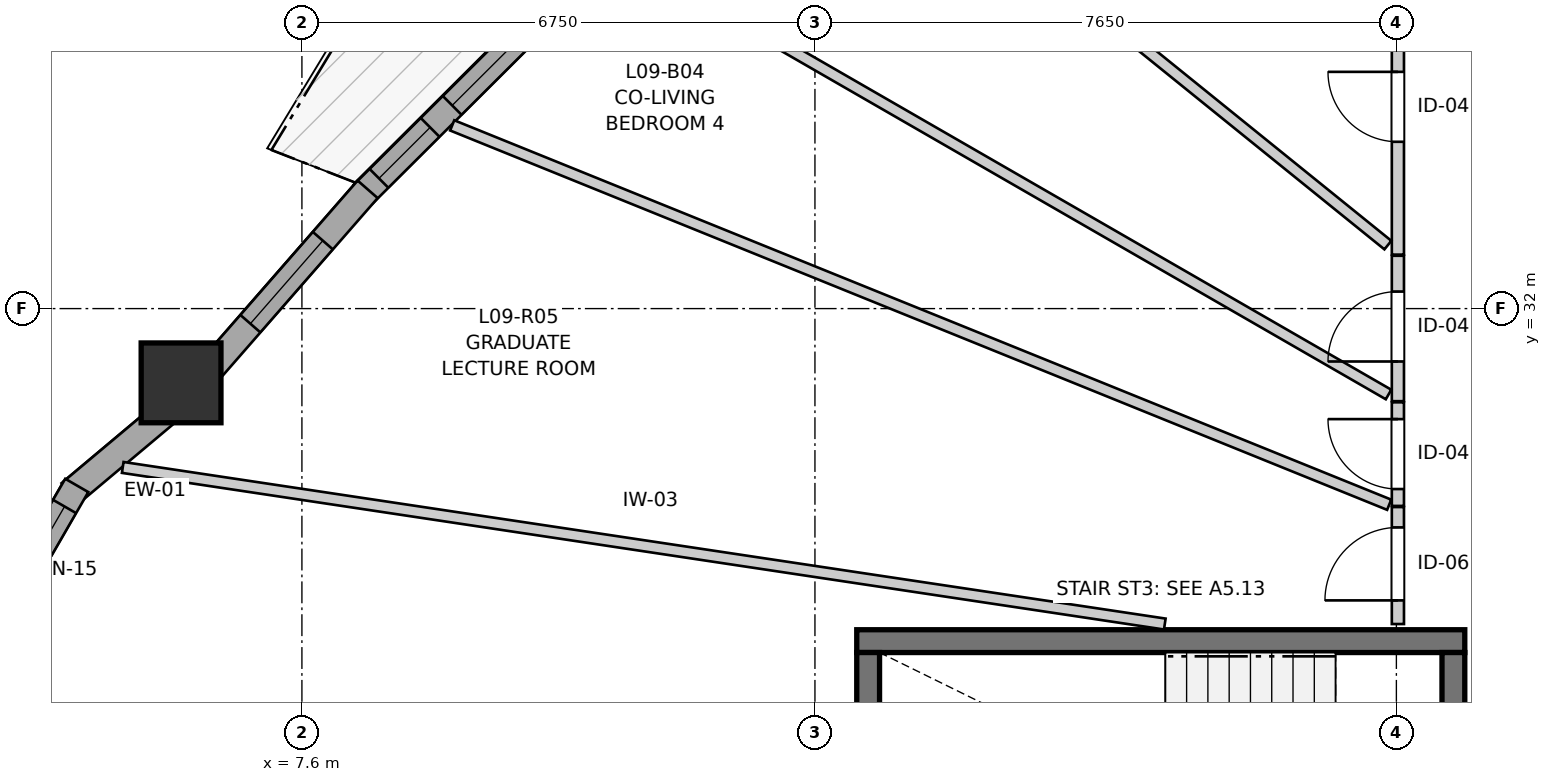
"""IFC4 building model, lengths in metres.
Left out: names, types, materials, properties, quantities, classifications, styles, units other than length and angle.
Written with IfcOpenShell. Run it as: python <this file> out.ifc"""

import sys

from ifc_helpers import new_model, si_unit, direction, frame, frame_2d, origin, origin_2d, place, context, subcontext, project, spatial, rectangle, extrude, source, transform, mapped, element, fill, save


model = new_model("IFC4")
c1 = context("Model", 3, precision=1e-05, world=origin(), true_north=direction((0.0, 1.0)))
c2 = subcontext(c1, "Body", "Model", "MODEL_VIEW")
j1 = project(units=[si_unit("LENGTHUNIT", "METRE"), si_unit("PLANEANGLEUNIT", "RADIAN")], contexts=[c1])
p1 = place(None, origin())
s1 = spatial("IfcSite", under=j1, at=p1, CompositionType="ELEMENT")
p2 = place(p1, origin())
s2 = spatial("IfcBuilding", under=s1, at=p2, CompositionType="ELEMENT")
p3 = place(p2, frame((0.0, 0.0, 33.4)))
s3 = spatial("IfcBuildingStorey", under=s2, at=p3, CompositionType="ELEMENT", Elevation=33.4)
p4 = place(p3, frame((22.9, 27.625, 0.0), z_axis=(0.0, 0.0, 1.0), x_axis=(-1.0, 0.0, 0.0)))
e1 = element("IfcWall", 1, at=p4, inside=s3, PredefinedType="SHEAR", context=c2, shape_type="SweptSolid", body=[
    extrude(rectangle(XDim=8.0, YDim=0.3, at=frame_2d((4.0, 0.0))), origin(), (0.0, 0.0, 1.0), 2.94),
])
p5 = place(p3, frame((15.05, 27.475, 0.0), z_axis=(0.0, 0.0, 1.0), x_axis=(0.0, -1.0, 0.0)))
e2 = element("IfcWall", 2, at=p5, inside=s3, PredefinedType="SHEAR", context=c2, shape_type="SweptSolid", body=[
    extrude(rectangle(XDim=2.95, YDim=0.3, at=frame_2d((1.475, 0.0))), origin(), (0.0, 0.0, 1.0), 2.94),
])
p6 = place(p3, frame((22.75, 24.525, 0.0), z_axis=(0.0, 0.0, 1.0), x_axis=(0.0, 1.0, 0.0)))
e3 = element("IfcWall", 3, at=p6, inside=s3, PredefinedType="SHEAR", context=c2, shape_type="SweptSolid", body=[
    extrude(rectangle(XDim=2.95, YDim=0.3, at=frame_2d((1.475, 0.0))), origin(), (0.0, 0.0, 1.0), 2.94),
])
p7 = place(p6, frame((0.985, 0.0, 0.0)))
e4 = element("IfcOpeningElement", 4, at=p7, cuts=e3, PredefinedType="OPENING", context=c2, shape_type="SweptSolid", body=[
    extrude(rectangle(XDim=0.98, YDim=2.15, at=frame_2d((0.49, 1.075))), frame((0.0, 0.16, 0.0), z_axis=(0.0, -1.0, 0.0), x_axis=(1.0, 0.0, 0.0)), (0.0, 0.0, 1.0), 0.32),
])
m1 = source(origin(), c2, "Body", "SweptSolid", [
    extrude(rectangle(XDim=1.05, YDim=1.05, at=origin_2d()), origin(), (0.0, 0.0, 1.0), 2.94),
])
p8 = place(p3, frame((6.01, 31.023, 0.0), z_axis=(0.0, 0.0, 1.0), x_axis=(1.0, 0.0, 0.0)))
e5 = element("IfcColumn", 5, at=p8, inside=s3, PredefinedType="COLUMN", context=c2, shape_type="MappedRepresentation", body=[
    mapped(m1, transform((0.0, 0.0, 0.0), x_axis=(1.0, 0.0, 0.0), y_axis=(0.0, 1.0, 0.0), z_axis=(0.0, 0.0, 1.0), scale=1.0)),
])
p9 = place(p3, frame((5.893, 30.696, 0.0), z_axis=(0.0, 0.0, 1.0), x_axis=(-0.766001205563, -0.64283913468, 0.0)))
e6 = element("IfcWall", 6, at=p9, inside=s3, PredefinedType="SOLIDWALL", context=c2, shape_type="SweptSolid", body=[
    extrude(rectangle(XDim=1.752, YDim=0.35, at=frame_2d((0.876, 0.0))), origin(), (0.0, 0.0, 1.0), 2.42),
])
p10 = place(p3, frame((4.637, 29.674, 0.0), z_axis=(0.0, 0.0, 1.0), x_axis=(-0.499995423472, -0.866028046028, 0.0)))
e7 = element("IfcWall", 7, at=p10, inside=s3, PredefinedType="SOLIDWALL", context=c2, shape_type="SweptSolid", body=[
    extrude(rectangle(XDim=2.09, YDim=0.35, at=frame_2d((1.045, 0.0))), origin(), (0.0, 0.0, 1.0), 2.42),
])
p11 = place(p10, frame((0.32, 0.0, 0.82)))
e8 = element("IfcOpeningElement", 8, at=p11, cuts=e7, PredefinedType="OPENING", context=c2, shape_type="SweptSolid", body=[
    extrude(rectangle(XDim=1.45, YDim=1.25, at=frame_2d((0.725, 0.625))), frame((0.0, 0.185, 0.0), z_axis=(0.0, -1.0, 0.0), x_axis=(1.0, 0.0, 0.0)), (0.0, 0.0, 1.0), 0.37),
])
p12 = place(p3, frame((10.841, 35.932, 0.0), z_axis=(0.0, 0.0, 1.0), x_axis=(-0.708383272101, -0.70582798174, 0.0)))
e9 = element("IfcWall", 9, at=p12, inside=s3, PredefinedType="SOLIDWALL", context=c2, shape_type="SweptSolid", body=[
    extrude(rectangle(XDim=3.439, YDim=0.35, at=frame_2d((1.72, 0.0))), origin(), (0.0, 0.0, 1.0), 2.42),
])
p13 = place(p12, frame((0.334, 0.0, 0.82)))
e10 = element("IfcOpeningElement", 10, at=p13, cuts=e9, PredefinedType="OPENING", context=c2, shape_type="SweptSolid", body=[
    extrude(rectangle(XDim=1.45, YDim=1.25, at=frame_2d((0.725, 0.625))), frame((0.0, 0.185, 0.0), z_axis=(0.0, -1.0, 0.0), x_axis=(1.0, 0.0, 0.0)), (0.0, 0.0, 1.0), 0.37),
])
p14 = place(p12, frame((2.194, 0.0, 0.82)))
e11 = element("IfcOpeningElement", 11, at=p14, cuts=e9, PredefinedType="OPENING", context=c2, shape_type="SweptSolid", body=[
    extrude(rectangle(XDim=0.95, YDim=1.35, at=frame_2d((0.475, 0.675))), frame((0.0, 0.185, 0.0), z_axis=(0.0, -1.0, 0.0), x_axis=(1.0, 0.0, 0.0)), (0.0, 0.0, 1.0), 0.37),
])
p15 = place(p3, frame((8.465, 33.569, 0.0), z_axis=(0.0, 0.0, 1.0), x_axis=(-0.657600500685, -0.753366830634, 0.0)))
e12 = element("IfcWall", 12, at=p15, inside=s3, PredefinedType="SOLIDWALL", context=c2, shape_type="SweptSolid", body=[
    extrude(rectangle(XDim=3.233, YDim=0.35, at=frame_2d((1.616, 0.0))), origin(), (0.0, 0.0, 1.0), 2.42),
])
p16 = place(p15, frame((0.896, 0.0, 0.82)))
e13 = element("IfcOpeningElement", 13, at=p16, cuts=e12, PredefinedType="OPENING", context=c2, shape_type="SweptSolid", body=[
    extrude(rectangle(XDim=1.45, YDim=1.25, at=frame_2d((0.725, 0.625))), frame((0.0, 0.185, 0.0), z_axis=(0.0, -1.0, 0.0), x_axis=(1.0, 0.0, 0.0)), (0.0, 0.0, 1.0), 0.37),
])
p17 = place(p3, frame((22.02, 32.71, 0.0), z_axis=(0.0, 0.0, 1.0), x_axis=(0.0, 1.0, 0.0)))
e14 = element("IfcWall", 14, at=p17, inside=s3, PredefinedType="PARTITIONING", context=c2, shape_type="SweptSolid", body=[
    extrude(rectangle(XDim=3.87, YDim=0.16, at=frame_2d((1.935, 0.0))), origin(), (0.0, 0.0, 1.0), 2.94),
])
p18 = place(p17, frame((1.485, 0.0, 0.0)))
e15 = element("IfcOpeningElement", 15, at=p18, cuts=e14, PredefinedType="OPENING", context=c2, shape_type="SweptSolid", body=[
    extrude(rectangle(XDim=0.92, YDim=2.1, at=frame_2d((0.46, 1.05))), frame((0.0, 0.09, 0.0), z_axis=(0.0, -1.0, 0.0), x_axis=(1.0, 0.0, 0.0)), (0.0, 0.0, 1.0), 0.18),
])
p19 = place(p3, frame((22.02, 30.782, 0.0), z_axis=(0.0, 0.0, 1.0), x_axis=(0.0, 1.0, 0.0)))
e16 = element("IfcWall", 16, at=p19, inside=s3, PredefinedType="PARTITIONING", context=c2, shape_type="SweptSolid", body=[
    extrude(rectangle(XDim=1.913, YDim=0.16, at=frame_2d((0.957, 0.0))), origin(), (0.0, 0.0, 1.0), 2.94),
])
p20 = place(p19, frame((0.522, 0.0, 0.0)))
e17 = element("IfcOpeningElement", 17, at=p20, cuts=e16, PredefinedType="OPENING", context=c2, shape_type="SweptSolid", body=[
    extrude(rectangle(XDim=0.92, YDim=2.1, at=frame_2d((0.46, 1.05))), frame((0.0, 0.09, 0.0), z_axis=(0.0, -1.0, 0.0), x_axis=(1.0, 0.0, 0.0)), (0.0, 0.0, 1.0), 0.18),
])
p21 = place(p3, frame((22.02, 27.85, 0.0), z_axis=(0.0, 0.0, 1.0), x_axis=(0.0, 1.0, 0.0)))
e18 = element("IfcWall", 18, at=p21, inside=s3, PredefinedType="PARTITIONING", context=c2, shape_type="SweptSolid", body=[
    extrude(rectangle(XDim=1.539, YDim=0.16, at=frame_2d((0.77, 0.0))), origin(), (0.0, 0.0, 1.0), 2.94),
])
p22 = place(p21, frame((0.311, 0.0, 0.0)))
e19 = element("IfcOpeningElement", 19, at=p22, cuts=e18, PredefinedType="OPENING", context=c2, shape_type="SweptSolid", body=[
    extrude(rectangle(XDim=0.96, YDim=2.1, at=frame_2d((0.48, 1.05))), frame((0.0, 0.09, 0.0), z_axis=(0.0, -1.0, 0.0), x_axis=(1.0, 0.0, 0.0)), (0.0, 0.0, 1.0), 0.18),
])
p23 = place(p3, frame((22.02, 29.404, 0.0), z_axis=(0.0, 0.0, 1.0), x_axis=(0.0, 1.0, 0.0)))
e20 = element("IfcWall", 20, at=p23, inside=s3, PredefinedType="PARTITIONING", context=c2, shape_type="SweptSolid", body=[
    extrude(rectangle(XDim=1.363, YDim=0.16, at=frame_2d((0.682, 0.0))), origin(), (0.0, 0.0, 1.0), 2.94),
])
p24 = place(p23, frame((0.222, 0.0, 0.0)))
e21 = element("IfcOpeningElement", 21, at=p24, cuts=e20, PredefinedType="OPENING", context=c2, shape_type="SweptSolid", body=[
    extrude(rectangle(XDim=0.92, YDim=2.1, at=frame_2d((0.46, 1.05))), frame((0.0, 0.09, 0.0), z_axis=(0.0, -1.0, 0.0), x_axis=(1.0, 0.0, 0.0)), (0.0, 0.0, 1.0), 0.18),
])
p25 = place(p3, frame((5.242, 29.91, 0.0), z_axis=(0.0, 0.0, 1.0), x_axis=(0.988899381561, -0.148586719285, 0.0)))
e22 = element("IfcWall", 22, at=p25, inside=s3, PredefinedType="PARTITIONING", context=c2, shape_type="SweptSolid", body=[
    extrude(rectangle(XDim=13.864, YDim=0.145, at=frame_2d((6.932, 0.0))), origin(), (0.0, 0.0, 1.0), 2.94),
])
p26 = place(p3, frame((9.577, 34.41, 0.0), z_axis=(0.0, 0.0, 1.0), x_axis=(0.926920362809, -0.375258099194, 0.0)))
e23 = element("IfcWall", 23, at=p26, inside=s3, PredefinedType="PARTITIONING", context=c2, shape_type="SweptSolid", body=[
    extrude(rectangle(XDim=13.3, YDim=0.145, at=frame_2d((6.65, 0.0))), origin(), (0.0, 0.0, 1.0), 2.94),
])
p27 = place(p3, frame((11.92, 36.618, 0.0), z_axis=(0.0, 0.0, 1.0), x_axis=(0.866473494239, -0.499223080177, 0.0)))
e24 = element("IfcWall", 24, at=p27, inside=s3, PredefinedType="PARTITIONING", context=c2, shape_type="SweptSolid", body=[
    extrude(rectangle(XDim=11.514, YDim=0.145, at=frame_2d((5.757, 0.0))), origin(), (0.0, 0.0, 1.0), 2.94),
])
p28 = place(p3, frame((14.566, 38.751, 0.0), z_axis=(0.0, 0.0, 1.0), x_axis=(0.777881688073, -0.628410756879, 0.0)))
e25 = element("IfcWall", 25, at=p28, inside=s3, PredefinedType="PARTITIONING", context=c2, shape_type="SweptSolid", body=[
    extrude(rectangle(XDim=9.413, YDim=0.145, at=frame_2d((4.707, 0.0))), origin(), (0.0, 0.0, 1.0), 2.94),
])
m2 = source(origin(), c2, "Body", "SweptSolid", [
    extrude(rectangle(XDim=1.45, YDim=1.25, at=frame_2d((0.725, 0.625))), frame((0.0, 0.03, 0.0), z_axis=(0.0, -1.0, 0.0), x_axis=(1.0, 0.0, 0.0)), (0.0, 0.0, 1.0), 0.06),
])
p29 = place(p11, origin())
e26 = element("IfcWindow", 26, at=p29, inside=s3, PartitioningType="SINGLE_PANEL", PredefinedType="WINDOW", context=c2, shape_type="MappedRepresentation", body=[
    mapped(m2, transform((0.0, 0.0, 0.0), x_axis=(1.0, 0.0, 0.0), y_axis=(0.0, 1.0, 0.0), z_axis=(0.0, 0.0, 1.0), scale=1.0)),
])
fill(e8, e26)
p30 = place(p13, origin())
e27 = element("IfcWindow", 27, at=p30, inside=s3, PartitioningType="SINGLE_PANEL", PredefinedType="WINDOW", context=c2, shape_type="MappedRepresentation", body=[
    mapped(m2, transform((0.0, 0.0, 0.0), x_axis=(1.0, 0.0, 0.0), y_axis=(0.0, 1.0, 0.0), z_axis=(0.0, 0.0, 1.0), scale=1.0)),
])
fill(e10, e27)
m3 = source(origin(), c2, "Body", "SweptSolid", [
    extrude(rectangle(XDim=0.95, YDim=1.35, at=frame_2d((0.475, 0.675))), frame((0.0, 0.03, 0.0), z_axis=(0.0, -1.0, 0.0), x_axis=(1.0, 0.0, 0.0)), (0.0, 0.0, 1.0), 0.06),
])
p31 = place(p14, origin())
e28 = element("IfcWindow", 28, at=p31, inside=s3, PartitioningType="SINGLE_PANEL", PredefinedType="WINDOW", context=c2, shape_type="MappedRepresentation", body=[
    mapped(m3, transform((0.0, 0.0, 0.0), x_axis=(1.0, 0.0, 0.0), y_axis=(0.0, 1.0, 0.0), z_axis=(0.0, 0.0, 1.0), scale=1.0)),
])
fill(e11, e28)
p32 = place(p16, origin())
e29 = element("IfcWindow", 29, at=p32, inside=s3, PartitioningType="SINGLE_PANEL", PredefinedType="WINDOW", context=c2, shape_type="MappedRepresentation", body=[
    mapped(m2, transform((0.0, 0.0, 0.0), x_axis=(1.0, 0.0, 0.0), y_axis=(0.0, 1.0, 0.0), z_axis=(0.0, 0.0, 1.0), scale=1.0)),
])
fill(e13, e29)
m4 = source(origin(), c2, "Body", "SweptSolid", [
    extrude(rectangle(XDim=0.92, YDim=2.1, at=frame_2d((0.46, 1.05))), frame((0.0, 0.025, 0.0), z_axis=(0.0, -1.0, 0.0), x_axis=(1.0, 0.0, 0.0)), (0.0, 0.0, 1.0), 0.05),
])
p33 = place(p18, origin())
e30 = element("IfcDoor", 30, at=p33, inside=s3, OperationType="SINGLE_SWING_RIGHT", PredefinedType="DOOR", context=c2, shape_type="MappedRepresentation", body=[
    mapped(m4, transform((0.0, 0.0, 0.0), x_axis=(1.0, 0.0, 0.0), y_axis=(0.0, 1.0, 0.0), z_axis=(0.0, 0.0, 1.0), scale=1.0)),
])
fill(e15, e30)
p34 = place(p20, origin())
e31 = element("IfcDoor", 31, at=p34, inside=s3, OperationType="SINGLE_SWING_LEFT", PredefinedType="DOOR", context=c2, shape_type="MappedRepresentation", body=[
    mapped(m4, transform((0.0, 0.0, 0.0), x_axis=(1.0, 0.0, 0.0), y_axis=(0.0, 1.0, 0.0), z_axis=(0.0, 0.0, 1.0), scale=1.0)),
])
fill(e17, e31)
m5 = source(origin(), c2, "Body", "SweptSolid", [
    extrude(rectangle(XDim=0.96, YDim=2.1, at=frame_2d((0.48, 1.05))), frame((0.0, 0.025, 0.0), z_axis=(0.0, -1.0, 0.0), x_axis=(1.0, 0.0, 0.0)), (0.0, 0.0, 1.0), 0.05),
])
p35 = place(p22, origin())
e32 = element("IfcDoor", 32, at=p35, inside=s3, OperationType="SINGLE_SWING_LEFT", PredefinedType="DOOR", context=c2, shape_type="MappedRepresentation", body=[
    mapped(m5, transform((0.0, 0.0, 0.0), x_axis=(1.0, 0.0, 0.0), y_axis=(0.0, 1.0, 0.0), z_axis=(0.0, 0.0, 1.0), scale=1.0)),
])
fill(e19, e32)
p36 = place(p24, origin())
e33 = element("IfcDoor", 33, at=p36, inside=s3, OperationType="SINGLE_SWING_RIGHT", PredefinedType="DOOR", context=c2, shape_type="MappedRepresentation", body=[
    mapped(m4, transform((0.0, 0.0, 0.0), x_axis=(1.0, 0.0, 0.0), y_axis=(0.0, 1.0, 0.0), z_axis=(0.0, 0.0, 1.0), scale=1.0)),
])
fill(e21, e33)
save(model, sys.argv[1])
